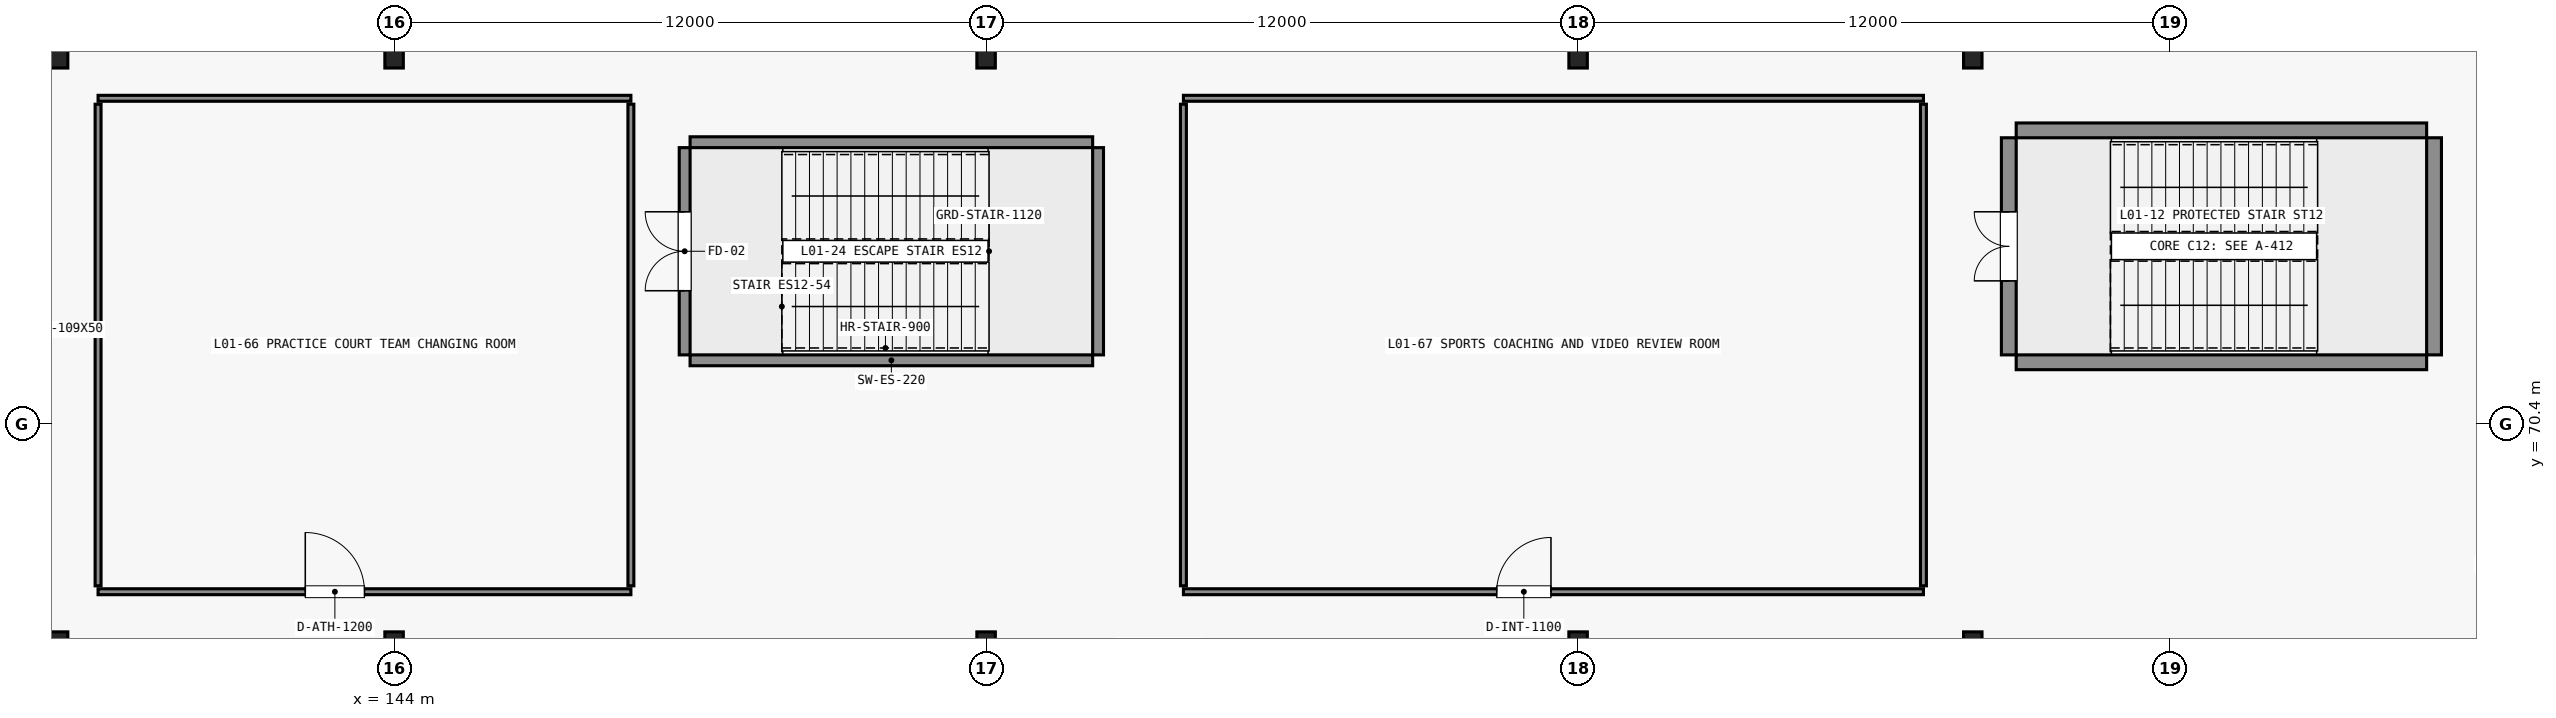
"""IFC4 building model, lengths in metres.
Left out: names, types, materials, properties, quantities, classifications, styles, units other than length and angle.
Written with IfcOpenShell. Run it as: python <this file> out.ifc"""

import sys

from ifc_helpers import new_model, si_unit, direction, frame, frame_2d, origin, origin_2d, place, context, subcontext, project, spatial, rectangle, i_section, extrude, element, fill, save


model = new_model("IFC4")
c1 = context("Model", 3, precision=1e-05, world=origin(), true_north=direction((0.0, 1.0)))
c2 = subcontext(c1, "Body", "Model", "MODEL_VIEW")
j1 = project(units=[si_unit("LENGTHUNIT", "METRE"), si_unit("PLANEANGLEUNIT", "RADIAN")], contexts=[c1])
p1 = place(None, origin())
s1 = spatial("IfcSite", under=j1, at=p1, CompositionType="ELEMENT")
p2 = place(p1, origin())
s2 = spatial("IfcBuilding", under=s1, at=p2, CompositionType="ELEMENT")
p3 = place(p2, frame((0.0, 0.0, 6.0)))
s3 = spatial("IfcBuildingStorey", under=s2, at=p3, CompositionType="ELEMENT", Elevation=6.0)
for number, where, z_axis, x_axis in (
    (1, (137.2, 66.0, 0.0), (0.0, 0.0, 1.0), (1.0, 0.0, 0.0)),
    (2, (137.2, 77.8, 0.0), (0.0, 0.0, 1.0), (1.0, 0.0, 0.0)),
    (3, (144.0, 66.0, 0.0), (0.0, 0.0, 1.0), (1.0, 0.0, 0.0)),
    (4, (144.0, 77.8, 0.0), (0.0, 0.0, 1.0), (1.0, 0.0, 0.0)),
    (5, (156.0, 66.0, 0.0), (0.0, 0.0, 1.0), (1.0, 0.0, 0.0)),
    (6, (156.0, 77.8, 0.0), (0.0, 0.0, 1.0), (1.0, 0.0, 0.0)),
    (7, (168.0, 66.0, 0.0), (0.0, 0.0, 1.0), (1.0, 0.0, 0.0)),
    (8, (168.0, 77.8, 0.0), (0.0, 0.0, 1.0), (1.0, 0.0, 0.0)),
    (9, (176.0, 66.0, 0.0), (0.0, 0.0, 1.0), (1.0, 0.0, 0.0)),
    (10, (176.0, 77.8, 0.0), (0.0, 0.0, 1.0), (1.0, 0.0, 0.0)),
):
    element("IfcColumn", number, at=place(p3, frame(where, z_axis=z_axis, x_axis=x_axis)), inside=s3, PredefinedType="COLUMN", context=c2, shape_type="SweptSolid", body=[
        extrude(i_section(OverallWidth=0.374, OverallDepth=0.373, WebThickness=0.016, FlangeThickness=0.026, FilletRadius=0.018, at=origin_2d()), origin(), (0.0, 0.0, 1.0), 5.4),
    ])
for number, where, z_axis, x_axis in (
    (11, (176.88, 71.65, 0.0), (0.0, 0.0, 1.0), (1.0, 0.0, 0.0)),
    (12, (176.88, 76.35, 0.0), (0.0, 0.0, 1.0), (1.0, 0.0, 0.0)),
):
    element("IfcWall", number, at=place(p3, frame(where, z_axis=z_axis, x_axis=x_axis)), inside=s3, PredefinedType="SHEAR", context=c2, shape_type="SweptSolid", body=[
        extrude(rectangle(XDim=8.32, YDim=0.3, at=frame_2d((4.16, 0.0))), origin(), (0.0, 0.0, 1.0), 5.4),
    ])
p4 = place(p3, frame((176.73, 71.8, 0.0), z_axis=(0.0, 0.0, 1.0), x_axis=(0.0, 1.0, 0.0)))
e13 = element("IfcWall", 13, at=p4, inside=s3, PredefinedType="SHEAR", context=c2, shape_type="SweptSolid", body=[
    extrude(rectangle(XDim=4.4, YDim=0.3, at=frame_2d((2.2, 0.0))), origin(), (0.0, 0.0, 1.0), 5.4),
])
p5 = place(p4, frame((1.5, 0.0, 0.0)))
e14 = element("IfcOpeningElement", 14, at=p5, cuts=e13, PredefinedType="OPENING", context=c2, shape_type="SweptSolid", body=[
    extrude(rectangle(XDim=1.4, YDim=2.2, at=frame_2d((0.7, 1.1))), frame((0.0, 0.16, 0.0), z_axis=(0.0, -1.0, 0.0), x_axis=(1.0, 0.0, 0.0)), (0.0, 0.0, 1.0), 0.32),
])
p6 = place(p3, frame((185.35, 71.8, 0.0), z_axis=(0.0, 0.0, 1.0), x_axis=(0.0, 1.0, 0.0)))
e15 = element("IfcWall", 15, at=p6, inside=s3, PredefinedType="SHEAR", context=c2, shape_type="SweptSolid", body=[
    extrude(rectangle(XDim=4.4, YDim=0.3, at=frame_2d((2.2, 0.0))), origin(), (0.0, 0.0, 1.0), 5.4),
])
for number, where, z_axis, x_axis in (
    (16, (150.0, 71.69, 0.0), (0.0, 0.0, 1.0), (1.0, 0.0, 0.0)),
    (17, (150.0, 76.11, 0.0), (0.0, 0.0, 1.0), (1.0, 0.0, 0.0)),
):
    element("IfcWall", number, at=place(p3, frame(where, z_axis=z_axis, x_axis=x_axis)), inside=s3, PredefinedType="SHEAR", context=c2, shape_type="SweptSolid", body=[
        extrude(rectangle(XDim=8.16, YDim=0.22, at=frame_2d((4.08, 0.0))), origin(), (0.0, 0.0, 1.0), 5.4),
    ])
p7 = place(p3, frame((149.89, 71.8, 0.0), z_axis=(0.0, 0.0, 1.0), x_axis=(0.0, 1.0, 0.0)))
e18 = element("IfcWall", 18, at=p7, inside=s3, PredefinedType="SHEAR", context=c2, shape_type="SweptSolid", body=[
    extrude(rectangle(XDim=4.2, YDim=0.22, at=frame_2d((2.1, 0.0))), origin(), (0.0, 0.0, 1.0), 5.4),
])
p8 = place(p7, frame((1.3, 0.0, 0.0)))
e19 = element("IfcOpeningElement", 19, at=p8, cuts=e18, PredefinedType="OPENING", context=c2, shape_type="SweptSolid", body=[
    extrude(rectangle(XDim=1.6, YDim=2.2, at=frame_2d((0.8, 1.1))), frame((0.0, 0.12, 0.0), z_axis=(0.0, -1.0, 0.0), x_axis=(1.0, 0.0, 0.0)), (0.0, 0.0, 1.0), 0.24),
])
p9 = place(p3, frame((158.27, 71.8, 0.0), z_axis=(0.0, 0.0, 1.0), x_axis=(0.0, 1.0, 0.0)))
e20 = element("IfcWall", 20, at=p9, inside=s3, PredefinedType="SHEAR", context=c2, shape_type="SweptSolid", body=[
    extrude(rectangle(XDim=4.2, YDim=0.22, at=frame_2d((2.1, 0.0))), origin(), (0.0, 0.0, 1.0), 5.4),
])
p10 = place(p3, frame((138.0, 67.0, 0.0), z_axis=(0.0, 0.0, 1.0), x_axis=(1.0, 0.0, 0.0)))
e21 = element("IfcWall", 21, at=p10, inside=s3, PredefinedType="PARTITIONING", context=c2, shape_type="SweptSolid", body=[
    extrude(rectangle(XDim=10.8, YDim=0.12, at=frame_2d((5.4, 0.0))), origin(), (0.0, 0.0, 1.0), 4.347),
])
p11 = place(p10, frame((4.2, 0.0, 0.0)))
e22 = element("IfcOpeningElement", 22, at=p11, cuts=e21, PredefinedType="OPENING", context=c2, shape_type="SweptSolid", body=[
    extrude(rectangle(XDim=1.2, YDim=2.2, at=frame_2d((0.6, 1.1))), frame((0.0, 0.07, 0.0), z_axis=(0.0, -1.0, 0.0), x_axis=(1.0, 0.0, 0.0)), (0.0, 0.0, 1.0), 0.14),
])
p12 = place(p3, frame((138.0, 77.0, 0.0), z_axis=(0.0, 0.0, 1.0), x_axis=(1.0, 0.0, 0.0)))
e23 = element("IfcWall", 23, at=p12, inside=s3, PredefinedType="PARTITIONING", context=c2, shape_type="SweptSolid", body=[
    extrude(rectangle(XDim=10.8, YDim=0.12, at=frame_2d((5.4, 0.0))), origin(), (0.0, 0.0, 1.0), 4.347),
])
for number, where, z_axis, x_axis in (
    (24, (138.0, 67.12, 0.0), (0.0, 0.0, 1.0), (0.0, 1.0, 0.0)),
    (25, (148.8, 67.12, 0.0), (0.0, 0.0, 1.0), (0.0, 1.0, 0.0)),
):
    element("IfcWall", number, at=place(p3, frame(where, z_axis=z_axis, x_axis=x_axis)), inside=s3, PredefinedType="PARTITIONING", context=c2, shape_type="SweptSolid", body=[
        extrude(rectangle(XDim=9.76, YDim=0.12, at=frame_2d((4.88, 0.0))), origin(), (0.0, 0.0, 1.0), 5.04),
    ])
p13 = place(p3, frame((160.0, 67.0, 0.0), z_axis=(0.0, 0.0, 1.0), x_axis=(1.0, 0.0, 0.0)))
e26 = element("IfcWall", 26, at=p13, inside=s3, PredefinedType="PARTITIONING", context=c2, shape_type="SweptSolid", body=[
    extrude(rectangle(XDim=15.0, YDim=0.12, at=frame_2d((7.5, 0.0))), origin(), (0.0, 0.0, 1.0), 4.347),
])
p14 = place(p13, frame((6.35, 0.0, 0.0)))
e27 = element("IfcOpeningElement", 27, at=p14, cuts=e26, PredefinedType="OPENING", context=c2, shape_type="SweptSolid", body=[
    extrude(rectangle(XDim=1.1, YDim=2.2, at=frame_2d((0.55, 1.1))), frame((0.0, 0.07, 0.0), z_axis=(0.0, -1.0, 0.0), x_axis=(1.0, 0.0, 0.0)), (0.0, 0.0, 1.0), 0.14),
])
p15 = place(p3, frame((160.0, 77.0, 0.0), z_axis=(0.0, 0.0, 1.0), x_axis=(1.0, 0.0, 0.0)))
e28 = element("IfcWall", 28, at=p15, inside=s3, PredefinedType="PARTITIONING", context=c2, shape_type="SweptSolid", body=[
    extrude(rectangle(XDim=15.0, YDim=0.12, at=frame_2d((7.5, 0.0))), origin(), (0.0, 0.0, 1.0), 4.347),
])
for number, where, z_axis, x_axis in (
    (29, (160.0, 67.12, 0.0), (0.0, 0.0, 1.0), (0.0, 1.0, 0.0)),
    (30, (175.0, 67.12, 0.0), (0.0, 0.0, 1.0), (0.0, 1.0, 0.0)),
):
    element("IfcWall", number, at=place(p3, frame(where, z_axis=z_axis, x_axis=x_axis)), inside=s3, PredefinedType="PARTITIONING", context=c2, shape_type="SweptSolid", body=[
        extrude(rectangle(XDim=9.76, YDim=0.12, at=frame_2d((4.88, 0.0))), origin(), (0.0, 0.0, 1.0), 5.04),
    ])
p16 = place(p5, origin())
e31 = element("IfcDoor", 31, at=p16, inside=s3, OperationType="DOUBLE_DOOR_SINGLE_SWING", PredefinedType="DOOR", context=c2, shape_type="SweptSolid", body=[
    extrude(rectangle(XDim=1.4, YDim=2.2, at=frame_2d((0.7, 1.1))), frame((0.0, 0.025, 0.0), z_axis=(0.0, -1.0, 0.0), x_axis=(1.0, 0.0, 0.0)), (0.0, 0.0, 1.0), 0.05),
])
fill(e14, e31)
p17 = place(p8, origin())
e32 = element("IfcDoor", 32, at=p17, inside=s3, OperationType="DOUBLE_DOOR_SINGLE_SWING", PredefinedType="DOOR", context=c2, shape_type="SweptSolid", body=[
    extrude(rectangle(XDim=1.6, YDim=2.2, at=frame_2d((0.8, 1.1))), frame((0.0, 0.025, 0.0), z_axis=(0.0, -1.0, 0.0), x_axis=(1.0, 0.0, 0.0)), (0.0, 0.0, 1.0), 0.05),
])
fill(e19, e32)
p18 = place(p11, origin())
e33 = element("IfcDoor", 33, at=p18, inside=s3, OperationType="SINGLE_SWING_LEFT", PredefinedType="DOOR", context=c2, shape_type="SweptSolid", body=[
    extrude(rectangle(XDim=1.2, YDim=2.2, at=frame_2d((0.6, 1.1))), frame((0.0, 0.025, 0.0), z_axis=(0.0, -1.0, 0.0), x_axis=(1.0, 0.0, 0.0)), (0.0, 0.0, 1.0), 0.05),
])
fill(e22, e33)
p19 = place(p14, origin())
e34 = element("IfcDoor", 34, at=p19, inside=s3, OperationType="SINGLE_SWING_RIGHT", PredefinedType="DOOR", context=c2, shape_type="SweptSolid", body=[
    extrude(rectangle(XDim=1.1, YDim=2.2, at=frame_2d((0.55, 1.1))), frame((0.0, 0.025, 0.0), z_axis=(0.0, -1.0, 0.0), x_axis=(1.0, 0.0, 0.0)), (0.0, 0.0, 1.0), 0.05),
])
fill(e27, e34)
save(model, sys.argv[1])
